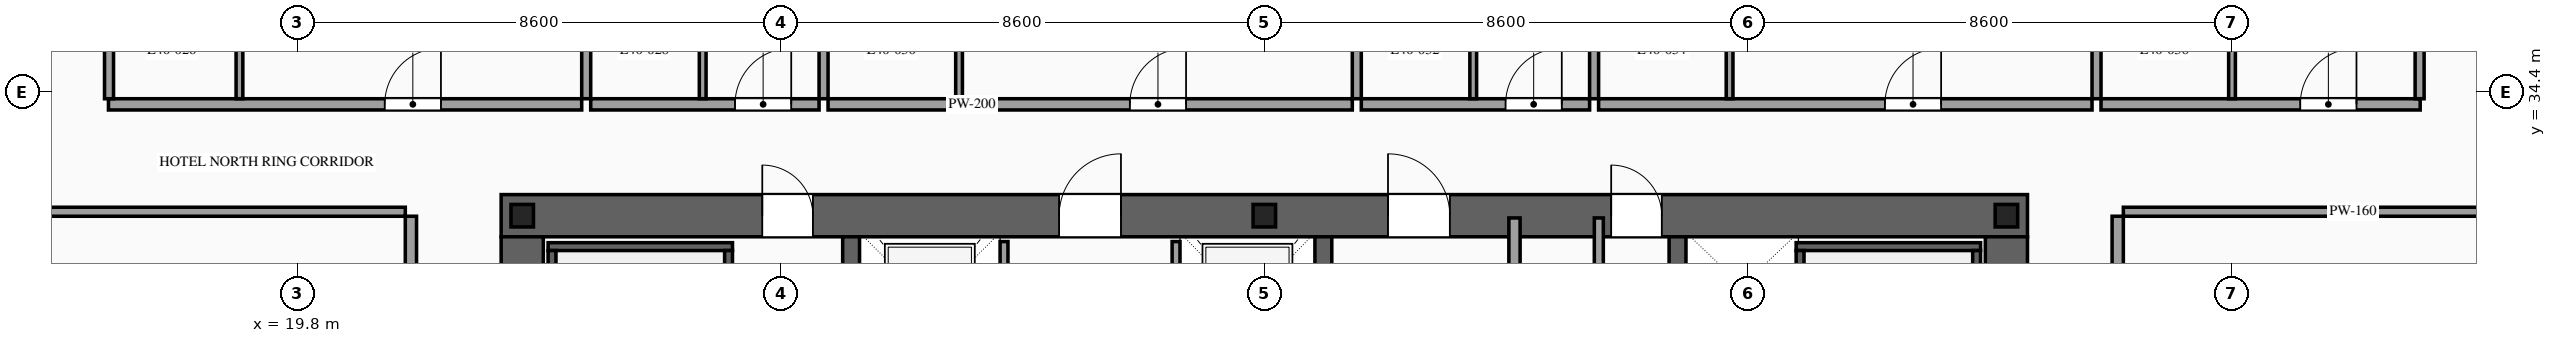
"""IFC4 building model, lengths in metres.
Left out: names, types, materials, properties, quantities, classifications, styles, units other than length and angle.
Written with IfcOpenShell. Run it as: python <this file> out.ifc"""

import sys

from ifc_helpers import new_model, si_unit, direction, frame, frame_2d, origin, origin_2d, place, context, subcontext, project, spatial, rectangle, i_section, extrude, source, transform, mapped, element, fill, save


model = new_model("IFC4")
c1 = context("Model", 3, precision=1e-05, world=origin(), true_north=direction((0.0, 1.0)))
c2 = subcontext(c1, "Body", "Model", "MODEL_VIEW")
j1 = project(units=[si_unit("LENGTHUNIT", "METRE"), si_unit("PLANEANGLEUNIT", "RADIAN")], contexts=[c1])
p1 = place(None, origin())
s1 = spatial("IfcSite", under=j1, at=p1, CompositionType="ELEMENT")
p2 = place(p1, origin())
s2 = spatial("IfcBuilding", under=s1, at=p2, CompositionType="ELEMENT")
p3 = place(p2, frame((0.0, 0.0, 152.4)))
s3 = spatial("IfcBuildingStorey", under=s2, at=p3, CompositionType="ELEMENT", Elevation=152.4)
p4 = place(p3, frame((23.425, 32.2, 0.0), z_axis=(0.0, 0.0, 1.0), x_axis=(1.0, 0.0, 0.0)))
e1 = element("IfcWall", 1, at=p4, inside=s3, PredefinedType="SHEAR", context=c2, shape_type="SweptSolid", body=[
    extrude(rectangle(XDim=27.15, YDim=0.75, at=frame_2d((13.575, 0.0))), origin(), (0.0, 0.0, 1.0), 3.6),
])
p5 = place(p4, frame((4.645, 0.0, 0.0)))
e2 = element("IfcOpeningElement", 2, at=p5, cuts=e1, PredefinedType="OPENING", context=c2, shape_type="SweptSolid", body=[
    extrude(rectangle(XDim=0.9, YDim=2.15, at=frame_2d((0.45, 1.075))), frame((0.0, 0.39, 0.0), z_axis=(0.0, -1.0, 0.0), x_axis=(1.0, 0.0, 0.0)), (0.0, 0.0, 1.0), 0.78),
])
p6 = place(p4, frame((9.925, 0.0, 0.0)))
e3 = element("IfcOpeningElement", 3, at=p6, cuts=e1, PredefinedType="OPENING", context=c2, shape_type="SweptSolid", body=[
    extrude(rectangle(XDim=1.1, YDim=2.2, at=frame_2d((0.55, 1.1))), frame((0.0, 0.39, 0.0), z_axis=(0.0, -1.0, 0.0), x_axis=(1.0, 0.0, 0.0)), (0.0, 0.0, 1.0), 0.78),
])
p7 = place(p4, frame((15.775, 0.0, 0.0)))
e4 = element("IfcOpeningElement", 4, at=p7, cuts=e1, PredefinedType="OPENING", context=c2, shape_type="SweptSolid", body=[
    extrude(rectangle(XDim=1.1, YDim=2.2, at=frame_2d((0.55, 1.1))), frame((0.0, 0.39, 0.0), z_axis=(0.0, -1.0, 0.0), x_axis=(1.0, 0.0, 0.0)), (0.0, 0.0, 1.0), 0.78),
])
p8 = place(p4, frame((19.745, 0.0, 0.0)))
e5 = element("IfcOpeningElement", 5, at=p8, cuts=e1, PredefinedType="OPENING", context=c2, shape_type="SweptSolid", body=[
    extrude(rectangle(XDim=0.9, YDim=2.15, at=frame_2d((0.45, 1.075))), frame((0.0, 0.39, 0.0), z_axis=(0.0, -1.0, 0.0), x_axis=(1.0, 0.0, 0.0)), (0.0, 0.0, 1.0), 0.78),
])
m1 = source(origin(), c2, "Body", "SweptSolid", [
    extrude(rectangle(XDim=12.05, YDim=0.75, at=frame_2d((6.025, 0.0))), origin(), (0.0, 0.0, 1.0), 3.6),
])
for number, where, z_axis, x_axis in (
    (6, (23.8, 19.775, 0.0), (0.0, 0.0, 1.0), (0.0, 1.0, 0.0)),
    (7, (50.2, 19.775, 0.0), (0.0, 0.0, 1.0), (0.0, 1.0, 0.0)),
):
    element("IfcWall", number, at=place(p3, frame(where, z_axis=z_axis, x_axis=x_axis)), inside=s3, PredefinedType="SHEAR", context=c2, shape_type="MappedRepresentation", body=[
        mapped(m1, transform((0.0, 0.0, 0.0), scale=1.0)),
    ])
m2 = source(origin(), c2, "Body", "SweptSolid", [
    extrude(rectangle(XDim=12.05, YDim=0.3, at=frame_2d((6.025, 0.0))), origin(), (0.0, 0.0, 1.0), 3.6),
])
for number, where, z_axis, x_axis in (
    (8, (29.65, 19.775, 0.0), (0.0, 0.0, 1.0), (0.0, 1.0, 0.0)),
    (9, (38.05, 19.775, 0.0), (0.0, 0.0, 1.0), (0.0, 1.0, 0.0)),
    (10, (44.35, 19.775, 0.0), (0.0, 0.0, 1.0), (0.0, 1.0, 0.0)),
):
    element("IfcWall", number, at=place(p3, frame(where, z_axis=z_axis, x_axis=x_axis)), inside=s3, PredefinedType="SOLIDWALL", context=c2, shape_type="MappedRepresentation", body=[
        mapped(m2, transform((0.0, 0.0, 0.0), scale=1.0)),
    ])
m3 = source(origin(), c2, "Body", "SweptSolid", [
    extrude(i_section(OverallWidth=0.4, OverallDepth=0.4, WebThickness=0.013, FlangeThickness=0.021, at=origin_2d()), origin(), (0.0, 0.0, 1.0), 3.6),
])
for number, where, z_axis, x_axis in (
    (11, (23.8, 32.2, 0.0), (0.0, 0.0, 1.0), (1.0, 0.0, 0.0)),
    (12, (37.0, 32.2, 0.0), (0.0, 0.0, 1.0), (1.0, 0.0, 0.0)),
    (13, (50.2, 32.2, 0.0), (0.0, 0.0, 1.0), (1.0, 0.0, 0.0)),
):
    element("IfcColumn", number, at=place(p3, frame(where, z_axis=z_axis, x_axis=x_axis)), inside=s3, PredefinedType="COLUMN", context=c2, shape_type="MappedRepresentation", body=[
        mapped(m3, transform((0.0, 0.0, 0.0), scale=1.0)),
    ])
p9 = place(p3, frame((32.37, 29.4, 0.0), z_axis=(0.0, 0.0, 1.0), x_axis=(0.0, 1.0, 0.0)))
e14 = element("IfcWall", 14, at=p9, inside=s3, PredefinedType="SOLIDWALL", context=c2, shape_type="SweptSolid", body=[
    extrude(rectangle(XDim=2.34, YDim=0.14, at=frame_2d((1.17, 0.0))), origin(), (0.0, 0.0, 1.0), 3.38),
])
p10 = place(p9, frame((0.62, 0.0, 0.0)))
e15 = element("IfcOpeningElement", 15, at=p10, cuts=e14, PredefinedType="OPENING", context=c2, shape_type="SweptSolid", body=[
    extrude(rectangle(XDim=1.1, YDim=2.2, at=frame_2d((0.55, 1.1))), frame((0.0, 0.085, 0.0), z_axis=(0.0, -1.0, 0.0), x_axis=(1.0, 0.0, 0.0)), (0.0, 0.0, 1.0), 0.17),
])
p11 = place(p3, frame((35.43, 29.4, 0.0), z_axis=(0.0, 0.0, 1.0), x_axis=(0.0, 1.0, 0.0)))
e16 = element("IfcWall", 16, at=p11, inside=s3, PredefinedType="SOLIDWALL", context=c2, shape_type="SweptSolid", body=[
    extrude(rectangle(XDim=2.34, YDim=0.14, at=frame_2d((1.17, 0.0))), origin(), (0.0, 0.0, 1.0), 3.38),
])
p12 = place(p11, frame((0.62, 0.0, 0.0)))
e17 = element("IfcOpeningElement", 17, at=p12, cuts=e16, PredefinedType="OPENING", context=c2, shape_type="SweptSolid", body=[
    extrude(rectangle(XDim=1.1, YDim=2.2, at=frame_2d((0.55, 1.1))), frame((0.0, 0.085, 0.0), z_axis=(0.0, -1.0, 0.0), x_axis=(1.0, 0.0, 0.0)), (0.0, 0.0, 1.0), 0.17),
])
m4 = source(origin(), c2, "Body", "SweptSolid", [
    extrude(rectangle(XDim=3.28, YDim=0.14, at=frame_2d((1.64, 0.0))), origin(), (0.0, 0.0, 1.0), 3.38),
])
p13 = place(p3, frame((24.26, 31.65, 0.0), z_axis=(0.0, 0.0, 1.0), x_axis=(1.0, 0.0, 0.0)))
e18 = element("IfcWall", 18, at=p13, inside=s3, PredefinedType="SOLIDWALL", context=c2, shape_type="MappedRepresentation", body=[
    mapped(m4, transform((0.0, 0.0, 0.0), scale=1.0)),
])
m5 = source(origin(), c2, "Body", "SweptSolid", [
    extrude(rectangle(XDim=8.94, YDim=0.14, at=frame_2d((4.47, 0.0))), origin(), (0.0, 0.0, 1.0), 3.38),
])
for number, where, z_axis, x_axis in (
    (19, (24.33, 22.64, 0.0), (0.0, 0.0, 1.0), (0.0, 1.0, 0.0)),
    (20, (27.47, 22.64, 0.0), (0.0, 0.0, 1.0), (0.0, 1.0, 0.0)),
):
    element("IfcWall", number, at=place(p3, frame(where, z_axis=z_axis, x_axis=x_axis)), inside=s3, PredefinedType="SOLIDWALL", context=c2, shape_type="MappedRepresentation", body=[
        mapped(m5, transform((0.0, 0.0, 0.0), scale=1.0)),
    ])
p14 = place(p3, frame((46.46, 31.65, 0.0), z_axis=(0.0, 0.0, 1.0), x_axis=(1.0, 0.0, 0.0)))
e21 = element("IfcWall", 21, at=p14, inside=s3, PredefinedType="SOLIDWALL", context=c2, shape_type="MappedRepresentation", body=[
    mapped(m4, transform((0.0, 0.0, 0.0), scale=1.0)),
])
for number, where, z_axis, x_axis in (
    (22, (46.53, 22.64, 0.0), (0.0, 0.0, 1.0), (0.0, 1.0, 0.0)),
    (23, (49.67, 22.64, 0.0), (0.0, 0.0, 1.0), (0.0, 1.0, 0.0)),
):
    element("IfcWall", number, at=place(p3, frame(where, z_axis=z_axis, x_axis=x_axis)), inside=s3, PredefinedType="SOLIDWALL", context=c2, shape_type="MappedRepresentation", body=[
        mapped(m5, transform((0.0, 0.0, 0.0), scale=1.0)),
    ])
m6 = source(origin(), c2, "Body", "SweptSolid", [
    extrude(rectangle(XDim=12.72, YDim=0.2, at=frame_2d((6.36, 0.0))), origin(), (0.0, 0.0, 1.0), 3.38),
])
p15 = place(p3, frame((41.45, 19.44, 0.0), z_axis=(0.0, 0.0, 1.0), x_axis=(0.0, 1.0, 0.0)))
e24 = element("IfcWall", 24, at=p15, inside=s3, PredefinedType="PARTITIONING", context=c2, shape_type="MappedRepresentation", body=[
    mapped(m6, transform((0.0, 0.0, 0.0), scale=1.0)),
])
m7 = source(origin(), c2, "Body", "SweptSolid", [
    extrude(rectangle(XDim=10.72, YDim=0.16, at=frame_2d((5.36, 0.0))), origin(), (0.0, 0.0, 1.0), 3.38),
])
p16 = place(p3, frame((42.95, 21.44, 0.0), z_axis=(0.0, 0.0, 1.0), x_axis=(0.0, 1.0, 0.0)))
e25 = element("IfcWall", 25, at=p16, inside=s3, PredefinedType="PARTITIONING", context=c2, shape_type="MappedRepresentation", body=[
    mapped(m7, transform((0.0, 0.0, 0.0), scale=1.0)),
])
p17 = place(p3, frame((16.44, 34.18, 0.0), z_axis=(0.0, 0.0, 1.0), x_axis=(1.0, 0.0, 0.0)))
e26 = element("IfcWall", 26, at=p17, inside=s3, PredefinedType="PARTITIONING", context=c2, shape_type="SweptSolid", body=[
    extrude(rectangle(XDim=8.418, YDim=0.2, at=frame_2d((4.209, 0.0))), origin(), (0.0, 0.0, 1.0), 3.38),
])
p18 = place(p17, frame((4.914, 0.0, 0.0)))
e27 = element("IfcOpeningElement", 27, at=p18, cuts=e26, PredefinedType="OPENING", context=c2, shape_type="SweptSolid", body=[
    extrude(rectangle(XDim=1.0, YDim=2.2, at=frame_2d((0.5, 1.1))), frame((0.0, 0.115, 0.0), z_axis=(0.0, -1.0, 0.0), x_axis=(1.0, 0.0, 0.0)), (0.0, 0.0, 1.0), 0.23),
])
m8 = source(origin(), c2, "Body", "SweptSolid", [
    extrude(rectangle(XDim=14.97, YDim=0.16, at=frame_2d((7.485, 0.0))), origin(), (0.0, 0.0, 1.0), 3.38),
])
p19 = place(p3, frame((24.938, 34.28, 0.0), z_axis=(0.0, 0.0, 1.0), x_axis=(0.0, 1.0, 0.0)))
e28 = element("IfcWall", 28, at=p19, inside=s3, PredefinedType="PARTITIONING", context=c2, shape_type="MappedRepresentation", body=[
    mapped(m8, transform((0.0, 0.0, 0.0), scale=1.0)),
])
m9 = source(origin(), c2, "Body", "SweptSolid", [
    extrude(rectangle(XDim=2.42, YDim=0.12, at=frame_2d((1.21, 0.0))), origin(), (0.0, 0.0, 1.0), 3.38),
])
p20 = place(p3, frame((18.77, 34.28, 0.0), z_axis=(0.0, 0.0, 1.0), x_axis=(0.0, 1.0, 0.0)))
e29 = element("IfcWall", 29, at=p20, inside=s3, PredefinedType="PARTITIONING", context=c2, shape_type="MappedRepresentation", body=[
    mapped(m9, transform((0.0, 0.0, 0.0), scale=1.0)),
])
p21 = place(p3, frame((25.018, 34.18, 0.0), z_axis=(0.0, 0.0, 1.0), x_axis=(1.0, 0.0, 0.0)))
e30 = element("IfcWall", 30, at=p21, inside=s3, PredefinedType="PARTITIONING", context=c2, shape_type="SweptSolid", body=[
    extrude(rectangle(XDim=4.062, YDim=0.2, at=frame_2d((2.031, 0.0))), origin(), (0.0, 0.0, 1.0), 3.38),
])
p22 = place(p21, frame((2.567, 0.0, 0.0)))
e31 = element("IfcOpeningElement", 31, at=p22, cuts=e30, PredefinedType="OPENING", context=c2, shape_type="SweptSolid", body=[
    extrude(rectangle(XDim=1.0, YDim=2.2, at=frame_2d((0.5, 1.1))), frame((0.0, 0.115, 0.0), z_axis=(0.0, -1.0, 0.0), x_axis=(1.0, 0.0, 0.0)), (0.0, 0.0, 1.0), 0.23),
])
p23 = place(p3, frame((29.16, 34.28, 0.0), z_axis=(0.0, 0.0, 1.0), x_axis=(0.0, 1.0, 0.0)))
e32 = element("IfcWall", 32, at=p23, inside=s3, PredefinedType="PARTITIONING", context=c2, shape_type="MappedRepresentation", body=[
    mapped(m8, transform((0.0, 0.0, 0.0), scale=1.0)),
])
p24 = place(p3, frame((27.01, 34.28, 0.0), z_axis=(0.0, 0.0, 1.0), x_axis=(0.0, 1.0, 0.0)))
e33 = element("IfcWall", 33, at=p24, inside=s3, PredefinedType="PARTITIONING", context=c2, shape_type="MappedRepresentation", body=[
    mapped(m9, transform((0.0, 0.0, 0.0), scale=1.0)),
])
p25 = place(p3, frame((29.24, 34.18, 0.0), z_axis=(0.0, 0.0, 1.0), x_axis=(1.0, 0.0, 0.0)))
e34 = element("IfcWall", 34, at=p25, inside=s3, PredefinedType="PARTITIONING", context=c2, shape_type="SweptSolid", body=[
    extrude(rectangle(XDim=9.325, YDim=0.2, at=frame_2d((4.663, 0.0))), origin(), (0.0, 0.0, 1.0), 3.38),
])
p26 = place(p25, frame((5.368, 0.0, 0.0)))
e35 = element("IfcOpeningElement", 35, at=p26, cuts=e34, PredefinedType="OPENING", context=c2, shape_type="SweptSolid", body=[
    extrude(rectangle(XDim=1.0, YDim=2.2, at=frame_2d((0.5, 1.1))), frame((0.0, 0.115, 0.0), z_axis=(0.0, -1.0, 0.0), x_axis=(1.0, 0.0, 0.0)), (0.0, 0.0, 1.0), 0.23),
])
p27 = place(p3, frame((38.645, 34.28, 0.0), z_axis=(0.0, 0.0, 1.0), x_axis=(0.0, 1.0, 0.0)))
e36 = element("IfcWall", 36, at=p27, inside=s3, PredefinedType="PARTITIONING", context=c2, shape_type="MappedRepresentation", body=[
    mapped(m8, transform((0.0, 0.0, 0.0), scale=1.0)),
])
p28 = place(p3, frame((31.57, 34.28, 0.0), z_axis=(0.0, 0.0, 1.0), x_axis=(0.0, 1.0, 0.0)))
e37 = element("IfcWall", 37, at=p28, inside=s3, PredefinedType="PARTITIONING", context=c2, shape_type="MappedRepresentation", body=[
    mapped(m9, transform((0.0, 0.0, 0.0), scale=1.0)),
])
p29 = place(p3, frame((38.725, 34.18, 0.0), z_axis=(0.0, 0.0, 1.0), x_axis=(1.0, 0.0, 0.0)))
e38 = element("IfcWall", 38, at=p29, inside=s3, PredefinedType="PARTITIONING", context=c2, shape_type="SweptSolid", body=[
    extrude(rectangle(XDim=4.061, YDim=0.2, at=frame_2d((2.03, 0.0))), origin(), (0.0, 0.0, 1.0), 3.38),
])
p30 = place(p29, frame((2.566, 0.0, 0.0)))
e39 = element("IfcOpeningElement", 39, at=p30, cuts=e38, PredefinedType="OPENING", context=c2, shape_type="SweptSolid", body=[
    extrude(rectangle(XDim=1.0, YDim=2.2, at=frame_2d((0.5, 1.1))), frame((0.0, 0.115, 0.0), z_axis=(0.0, -1.0, 0.0), x_axis=(1.0, 0.0, 0.0)), (0.0, 0.0, 1.0), 0.23),
])
p31 = place(p3, frame((42.866, 34.28, 0.0), z_axis=(0.0, 0.0, 1.0), x_axis=(0.0, 1.0, 0.0)))
e40 = element("IfcWall", 40, at=p31, inside=s3, PredefinedType="PARTITIONING", context=c2, shape_type="MappedRepresentation", body=[
    mapped(m8, transform((0.0, 0.0, 0.0), scale=1.0)),
])
p32 = place(p3, frame((40.716, 34.28, 0.0), z_axis=(0.0, 0.0, 1.0), x_axis=(0.0, 1.0, 0.0)))
e41 = element("IfcWall", 41, at=p32, inside=s3, PredefinedType="PARTITIONING", context=c2, shape_type="MappedRepresentation", body=[
    mapped(m9, transform((0.0, 0.0, 0.0), scale=1.0)),
])
p33 = place(p3, frame((42.946, 34.18, 0.0), z_axis=(0.0, 0.0, 1.0), x_axis=(1.0, 0.0, 0.0)))
e42 = element("IfcWall", 42, at=p33, inside=s3, PredefinedType="PARTITIONING", context=c2, shape_type="SweptSolid", body=[
    extrude(rectangle(XDim=8.777, YDim=0.2, at=frame_2d((4.388, 0.0))), origin(), (0.0, 0.0, 1.0), 3.38),
])
p34 = place(p33, frame((5.093, 0.0, 0.0)))
e43 = element("IfcOpeningElement", 43, at=p34, cuts=e42, PredefinedType="OPENING", context=c2, shape_type="SweptSolid", body=[
    extrude(rectangle(XDim=1.0, YDim=2.2, at=frame_2d((0.5, 1.1))), frame((0.0, 0.115, 0.0), z_axis=(0.0, -1.0, 0.0), x_axis=(1.0, 0.0, 0.0)), (0.0, 0.0, 1.0), 0.23),
])
p35 = place(p3, frame((51.803, 34.28, 0.0), z_axis=(0.0, 0.0, 1.0), x_axis=(0.0, 1.0, 0.0)))
e44 = element("IfcWall", 44, at=p35, inside=s3, PredefinedType="PARTITIONING", context=c2, shape_type="MappedRepresentation", body=[
    mapped(m8, transform((0.0, 0.0, 0.0), scale=1.0)),
])
p36 = place(p3, frame((45.276, 34.28, 0.0), z_axis=(0.0, 0.0, 1.0), x_axis=(0.0, 1.0, 0.0)))
e45 = element("IfcWall", 45, at=p36, inside=s3, PredefinedType="PARTITIONING", context=c2, shape_type="MappedRepresentation", body=[
    mapped(m9, transform((0.0, 0.0, 0.0), scale=1.0)),
])
p37 = place(p3, frame((51.883, 34.18, 0.0), z_axis=(0.0, 0.0, 1.0), x_axis=(1.0, 0.0, 0.0)))
e46 = element("IfcWall", 46, at=p37, inside=s3, PredefinedType="PARTITIONING", context=c2, shape_type="SweptSolid", body=[
    extrude(rectangle(XDim=5.677, YDim=0.2, at=frame_2d((2.838, 0.0))), origin(), (0.0, 0.0, 1.0), 3.38),
])
p38 = place(p37, frame((3.544, 0.0, 0.0)))
e47 = element("IfcOpeningElement", 47, at=p38, cuts=e46, PredefinedType="OPENING", context=c2, shape_type="SweptSolid", body=[
    extrude(rectangle(XDim=1.0, YDim=2.2, at=frame_2d((0.5, 1.1))), frame((0.0, 0.115, 0.0), z_axis=(0.0, -1.0, 0.0), x_axis=(1.0, 0.0, 0.0)), (0.0, 0.0, 1.0), 0.23),
])
m10 = source(origin(), c2, "Body", "SweptSolid", [
    extrude(rectangle(XDim=14.82, YDim=0.16, at=frame_2d((7.41, 0.0))), origin(), (0.0, 0.0, 1.0), 3.38),
])
for number, where, z_axis, x_axis in (
    (48, (16.45, 34.28, 0.0), (0.0, 0.0, 1.0), (0.0, 1.0, 0.0)),
    (49, (57.55, 34.28, 0.0), (0.0, 0.0, 1.0), (0.0, 1.0, 0.0)),
):
    element("IfcWall", number, at=place(p3, frame(where, z_axis=z_axis, x_axis=x_axis)), inside=s3, PredefinedType="PARTITIONING", context=c2, shape_type="MappedRepresentation", body=[
        mapped(m10, transform((0.0, 0.0, 0.0), scale=1.0)),
    ])
p39 = place(p3, frame((54.213, 34.28, 0.0), z_axis=(0.0, 0.0, 1.0), x_axis=(0.0, 1.0, 0.0)))
e50 = element("IfcWall", 50, at=p39, inside=s3, PredefinedType="PARTITIONING", context=c2, shape_type="MappedRepresentation", body=[
    mapped(m9, transform((0.0, 0.0, 0.0), scale=1.0)),
])
p40 = place(p3, frame((21.82, 25.88, 0.0), z_axis=(0.0, 0.0, 1.0), x_axis=(0.0, 1.0, 0.0)))
e51 = element("IfcWall", 51, at=p40, inside=s3, PredefinedType="PARTITIONING", context=c2, shape_type="SweptSolid", body=[
    extrude(rectangle(XDim=6.31, YDim=0.2, at=frame_2d((3.155, 0.0))), origin(), (0.0, 0.0, 1.0), 3.38),
])
p41 = place(p40, frame((2.655, 0.0, 0.0)))
e52 = element("IfcOpeningElement", 52, at=p41, cuts=e51, PredefinedType="OPENING", context=c2, shape_type="SweptSolid", body=[
    extrude(rectangle(XDim=1.0, YDim=2.2, at=frame_2d((0.5, 1.1))), frame((0.0, 0.115, 0.0), z_axis=(0.0, -1.0, 0.0), x_axis=(1.0, 0.0, 0.0)), (0.0, 0.0, 1.0), 0.23),
])
m11 = source(origin(), c2, "Body", "SweptSolid", [
    extrude(rectangle(XDim=8.17, YDim=0.16, at=frame_2d((4.085, 0.0))), origin(), (0.0, 0.0, 1.0), 2.875),
])
p42 = place(p3, frame((13.55, 32.27, 0.0), z_axis=(0.0, 0.0, 1.0), x_axis=(1.0, 0.0, 0.0)))
e53 = element("IfcWall", 53, at=p42, inside=s3, PredefinedType="PARTITIONING", context=c2, shape_type="MappedRepresentation", body=[
    mapped(m11, transform((0.0, 0.0, 0.0), scale=1.0)),
])
p43 = place(p3, frame((52.18, 25.88, 0.0), z_axis=(0.0, 0.0, 1.0), x_axis=(0.0, 1.0, 0.0)))
e54 = element("IfcWall", 54, at=p43, inside=s3, PredefinedType="PARTITIONING", context=c2, shape_type="SweptSolid", body=[
    extrude(rectangle(XDim=6.31, YDim=0.2, at=frame_2d((3.155, 0.0))), origin(), (0.0, 0.0, 1.0), 3.38),
])
p44 = place(p43, frame((3.835, 0.0, 0.0)))
e55 = element("IfcOpeningElement", 55, at=p44, cuts=e54, PredefinedType="OPENING", context=c2, shape_type="SweptSolid", body=[
    extrude(rectangle(XDim=1.0, YDim=2.2, at=frame_2d((0.5, 1.1))), frame((0.0, 0.115, 0.0), z_axis=(0.0, -1.0, 0.0), x_axis=(1.0, 0.0, 0.0)), (0.0, 0.0, 1.0), 0.23),
])
p45 = place(p3, frame((52.28, 32.27, 0.0), z_axis=(0.0, 0.0, 1.0), x_axis=(1.0, 0.0, 0.0)))
e56 = element("IfcWall", 56, at=p45, inside=s3, PredefinedType="PARTITIONING", context=c2, shape_type="MappedRepresentation", body=[
    mapped(m11, transform((0.0, 0.0, 0.0), scale=1.0)),
])
m12 = source(origin(), c2, "Body", "SweptSolid", [
    extrude(rectangle(XDim=0.9, YDim=2.15, at=frame_2d((0.45, 1.075))), frame((0.0, 0.025, 0.0), z_axis=(0.0, -1.0, 0.0), x_axis=(1.0, 0.0, 0.0)), (0.0, 0.0, 1.0), 0.05),
])
p46 = place(p5, origin())
e57 = element("IfcDoor", 57, at=p46, inside=s3, OperationType="SINGLE_SWING_LEFT", PredefinedType="DOOR", context=c2, shape_type="MappedRepresentation", body=[
    mapped(m12, transform((0.0, 0.0, 0.0), scale=1.0)),
])
fill(e2, e57)
m13 = source(origin(), c2, "Body", "SweptSolid", [
    extrude(rectangle(XDim=1.1, YDim=2.2, at=frame_2d((0.55, 1.1))), frame((0.0, 0.025, 0.0), z_axis=(0.0, -1.0, 0.0), x_axis=(1.0, 0.0, 0.0)), (0.0, 0.0, 1.0), 0.05),
])
p47 = place(p6, origin())
e58 = element("IfcDoor", 58, at=p47, inside=s3, OperationType="SINGLE_SWING_RIGHT", PredefinedType="DOOR", context=c2, shape_type="MappedRepresentation", body=[
    mapped(m13, transform((0.0, 0.0, 0.0), scale=1.0)),
])
fill(e3, e58)
p48 = place(p7, origin())
e59 = element("IfcDoor", 59, at=p48, inside=s3, OperationType="SINGLE_SWING_LEFT", PredefinedType="DOOR", context=c2, shape_type="MappedRepresentation", body=[
    mapped(m13, transform((0.0, 0.0, 0.0), scale=1.0)),
])
fill(e4, e59)
p49 = place(p8, origin())
e60 = element("IfcDoor", 60, at=p49, inside=s3, OperationType="SINGLE_SWING_LEFT", PredefinedType="DOOR", context=c2, shape_type="MappedRepresentation", body=[
    mapped(m12, transform((0.0, 0.0, 0.0), scale=1.0)),
])
fill(e5, e60)
m14 = source(origin(), c2, "Body", "SweptSolid", [
    extrude(rectangle(XDim=1.0, YDim=2.2, at=frame_2d((0.5, 1.1))), frame((0.0, 0.025, 0.0), z_axis=(0.0, -1.0, 0.0), x_axis=(1.0, 0.0, 0.0)), (0.0, 0.0, 1.0), 0.05),
])
p50 = place(p18, origin())
e61 = element("IfcDoor", 61, at=p50, inside=s3, OperationType="SINGLE_SWING_RIGHT", PredefinedType="DOOR", context=c2, shape_type="MappedRepresentation", body=[
    mapped(m14, transform((0.0, 0.0, 0.0), scale=1.0)),
])
fill(e27, e61)
p51 = place(p22, origin())
e62 = element("IfcDoor", 62, at=p51, inside=s3, OperationType="SINGLE_SWING_RIGHT", PredefinedType="DOOR", context=c2, shape_type="MappedRepresentation", body=[
    mapped(m14, transform((0.0, 0.0, 0.0), scale=1.0)),
])
fill(e31, e62)
p52 = place(p26, origin())
e63 = element("IfcDoor", 63, at=p52, inside=s3, OperationType="SINGLE_SWING_RIGHT", PredefinedType="DOOR", context=c2, shape_type="MappedRepresentation", body=[
    mapped(m14, transform((0.0, 0.0, 0.0), scale=1.0)),
])
fill(e35, e63)
p53 = place(p30, origin())
e64 = element("IfcDoor", 64, at=p53, inside=s3, OperationType="SINGLE_SWING_RIGHT", PredefinedType="DOOR", context=c2, shape_type="MappedRepresentation", body=[
    mapped(m14, transform((0.0, 0.0, 0.0), scale=1.0)),
])
fill(e39, e64)
p54 = place(p34, origin())
e65 = element("IfcDoor", 65, at=p54, inside=s3, OperationType="SINGLE_SWING_RIGHT", PredefinedType="DOOR", context=c2, shape_type="MappedRepresentation", body=[
    mapped(m14, transform((0.0, 0.0, 0.0), scale=1.0)),
])
fill(e43, e65)
p55 = place(p38, origin())
e66 = element("IfcDoor", 66, at=p55, inside=s3, OperationType="SINGLE_SWING_RIGHT", PredefinedType="DOOR", context=c2, shape_type="MappedRepresentation", body=[
    mapped(m14, transform((0.0, 0.0, 0.0), scale=1.0)),
])
fill(e47, e66)
save(model, sys.argv[1])
